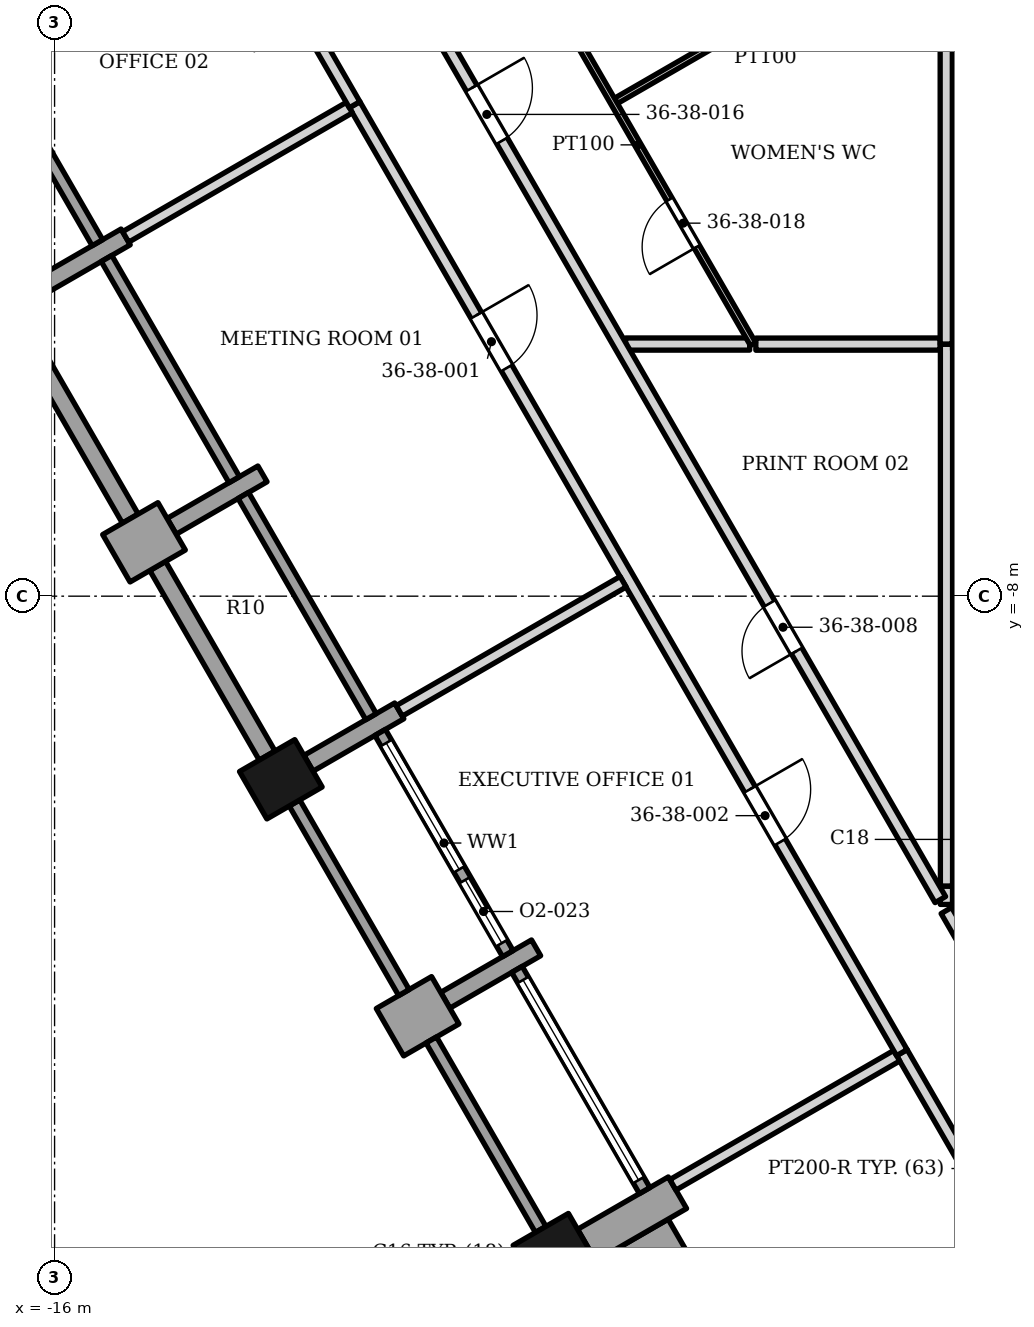
"""IFC4 building model, lengths in metres.
Left out: names, types, materials, properties, quantities, classifications, styles, units other than length and angle.
Written with IfcOpenShell. Run it as: python <this file> out.ifc"""

import sys

from ifc_helpers import new_model, si_unit, direction, frame, frame_2d, origin, origin_2d, place, context, subcontext, project, spatial, polyline, rectangle, outline, extrude, element, fill, save


model = new_model("IFC4")
c1 = context("Model", 3, precision=1e-05, world=origin(), true_north=direction((0.0, 1.0)))
c2 = subcontext(c1, "Body", "Model", "MODEL_VIEW")
j1 = project(units=[si_unit("LENGTHUNIT", "METRE"), si_unit("PLANEANGLEUNIT", "RADIAN")], contexts=[c1])
p1 = place(None, origin())
s1 = spatial("IfcSite", under=j1, at=p1, CompositionType="ELEMENT")
p2 = place(p1, origin())
s2 = spatial("IfcBuilding", under=s1, at=p2, CompositionType="ELEMENT")
p3 = place(p2, frame((0.0, 0.0, 156.3)))
s3 = spatial("IfcBuildingStorey", under=s2, at=p3, CompositionType="ELEMENT", Elevation=156.3)
for number, where, z_axis, x_axis in (
    (1, (-12.279, -11.011, 0.0), (0.0, 0.0, 1.0), (0.5, -0.866, 0.0)),
    (2, (-7.779, -18.803, 0.0), (0.0, 0.0, 1.0), (0.5, -0.866, 0.0)),
):
    element("IfcColumn", number, at=place(p3, frame(where, z_axis=z_axis, x_axis=x_axis)), inside=s3, PredefinedType="COLUMN", context=c2, shape_type="SweptSolid", body=[
        extrude(rectangle(XDim=0.9, YDim=1.05, at=origin_2d()), origin(), (0.0, 0.0, 1.0), 3.9),
    ])
p4 = place(p3, frame((-16.324, -2.954, 0.0), z_axis=(0.0, 0.0, 1.0), x_axis=(0.86597814115, 0.500081852351, 0.0)))
e3 = element("IfcWall", 3, at=p4, inside=s3, PredefinedType="SOLIDWALL", context=c2, shape_type="SweptSolid", body=[
    extrude(rectangle(XDim=1.725, YDim=0.3, at=frame_2d((0.862, 0.0))), origin(), (0.0, 0.0, 1.0), 3.0),
])
p5 = place(p3, frame((-14.984, -7.376, 0.0), z_axis=(0.0, 0.0, 1.0), x_axis=(0.866030680601, 0.499990860175, 0.0)))
e4 = element("IfcWall", 4, at=p5, inside=s3, PredefinedType="SOLIDWALL", context=c2, shape_type="SweptSolid", body=[
    extrude(rectangle(XDim=1.05, YDim=0.9, at=frame_2d((0.525, 0.0))), origin(), (0.0, 0.0, 1.0), 3.0),
])
p6 = place(p3, frame((-14.075, -6.852, 0.0), z_axis=(0.0, 0.0, 1.0), x_axis=(0.866013532718, 0.500020560727, 0.0)))
e5 = element("IfcWall", 5, at=p6, inside=s3, PredefinedType="SOLIDWALL", context=c2, shape_type="SweptSolid", body=[
    extrude(rectangle(XDim=1.725, YDim=0.3, at=frame_2d((0.863, 0.0))), origin(), (0.0, 0.0, 1.0), 2.973),
])
p7 = place(p3, frame((-10.331, -9.886, 0.0), z_axis=(0.0, 0.0, 1.0), x_axis=(-0.86597814115, -0.500081852351, 0.0)))
e6 = element("IfcWall", 6, at=p7, inside=s3, PredefinedType="SOLIDWALL", context=c2, shape_type="SweptSolid", body=[
    extrude(rectangle(XDim=1.725, YDim=0.3, at=frame_2d((0.862, 0.0))), origin(), (0.0, 0.0, 1.0), 3.0),
])
p8 = place(p3, frame((-10.484, -15.171, 0.0), z_axis=(0.0, 0.0, 1.0), x_axis=(0.866030680601, 0.499990860175, 0.0)))
e7 = element("IfcWall", 7, at=p8, inside=s3, PredefinedType="SOLIDWALL", context=c2, shape_type="SweptSolid", body=[
    extrude(rectangle(XDim=1.05, YDim=0.9, at=frame_2d((0.525, 0.0))), origin(), (0.0, 0.0, 1.0), 3.0),
])
p9 = place(p3, frame((-9.575, -14.646, 0.0), z_axis=(0.0, 0.0, 1.0), x_axis=(0.866013532718, 0.500020560727, 0.0)))
e8 = element("IfcWall", 8, at=p9, inside=s3, PredefinedType="SOLIDWALL", context=c2, shape_type="SweptSolid", body=[
    extrude(rectangle(XDim=1.725, YDim=0.3, at=frame_2d((0.863, 0.0))), origin(), (0.0, 0.0, 1.0), 3.0),
])
p10 = place(p3, frame((-5.756, -17.81, 0.0), z_axis=(0.0, 0.0, 1.0), x_axis=(-0.866074815912, -0.499914405916, 0.0)))
e9 = element("IfcWall", 9, at=p10, inside=s3, PredefinedType="SOLIDWALL", context=c2, shape_type="SweptSolid", body=[
    extrude(rectangle(XDim=1.725, YDim=0.6, at=frame_2d((0.862, 0.0))), origin(), (0.0, 0.0, 1.0), 3.0),
])
p11 = place(p3, frame((-17.396, 1.45, 0.0), z_axis=(0.0, 0.0, 1.0), x_axis=(0.500002543286, -0.866023935413, 0.0)))
e10 = element("IfcWall", 10, at=p11, inside=s3, PredefinedType="ELEMENTEDWALL", context=c2, shape_type="SweptSolid", body=[
    extrude(rectangle(XDim=4.2, YDim=0.2, at=frame_2d((2.1, 0.0))), origin(), (0.0, 0.0, 1.0), 3.0),
])
p12 = place(p3, frame((-16.554, -3.606, 0.0), z_axis=(0.0, 0.0, 1.0), x_axis=(0.499931829785, -0.866064758299, 0.0)))
e11 = element("IfcWall", 11, at=p12, inside=s3, PredefinedType="SOLIDWALL", context=c2, shape_type="SweptSolid", body=[
    extrude(rectangle(XDim=3.6, YDim=0.3, at=frame_2d((1.8, 0.0))), origin(), (0.0, 0.0, 1.0), 3.0),
])
p13 = place(p3, frame((-15.146, -2.447, 0.0), z_axis=(0.0, 0.0, 1.0), x_axis=(0.500027713859, -0.866009402589, 0.0)))
e12 = element("IfcWall", 12, at=p13, inside=s3, PredefinedType="ELEMENTEDWALL", context=c2, shape_type="SweptSolid", body=[
    extrude(rectangle(XDim=4.2, YDim=0.2, at=frame_2d((2.1, 0.0))), origin(), (0.0, 0.0, 1.0), 2.973),
])
p14 = place(p3, frame((-14.304, -7.504, 0.0), z_axis=(0.0, 0.0, 1.0), x_axis=(0.499961193289, -0.866047807691, 0.0)))
e13 = element("IfcWall", 13, at=p14, inside=s3, PredefinedType="SOLIDWALL", context=c2, shape_type="SweptSolid", body=[
    extrude(rectangle(XDim=3.6, YDim=0.3, at=frame_2d((1.8, 0.0))), origin(), (0.0, 0.0, 1.0), 2.973),
])
p15 = place(p3, frame((-12.896, -6.344, 0.0), z_axis=(0.0, 0.0, 1.0), x_axis=(0.500002543286, -0.866023935413, 0.0)))
e14 = element("IfcWall", 14, at=p15, inside=s3, PredefinedType="ELEMENTEDWALL", context=c2, shape_type="SweptSolid", body=[
    extrude(rectangle(XDim=4.2, YDim=0.2, at=frame_2d((2.1, 0.0))), origin(), (0.0, 0.0, 1.0), 3.0),
])
p16 = place(p3, frame((-12.054, -11.401, 0.0), z_axis=(0.0, 0.0, 1.0), x_axis=(0.499961193289, -0.866047807691, 0.0)))
e15 = element("IfcWall", 15, at=p16, inside=s3, PredefinedType="SOLIDWALL", context=c2, shape_type="SweptSolid", body=[
    extrude(rectangle(XDim=3.6, YDim=0.2, at=frame_2d((1.8, 0.0))), origin(), (0.0, 0.0, 1.0), 2.95),
])
p17 = place(p3, frame((-10.646, -10.241, 0.0), z_axis=(0.0, 0.0, 1.0), x_axis=(0.500027713859, -0.866009402589, 0.0)))
e16 = element("IfcWall", 16, at=p17, inside=s3, PredefinedType="ELEMENTEDWALL", context=c2, shape_type="SweptSolid", body=[
    extrude(rectangle(XDim=4.2, YDim=0.2, at=frame_2d((2.1, 0.0))), origin(), (0.0, 0.0, 1.0), 2.95),
])
p18 = place(p17, frame((0.2, 0.0, 0.45)))
e17 = element("IfcOpeningElement", 17, at=p18, cuts=e16, PredefinedType="OPENING", context=c2, shape_type="SweptSolid", body=[
    extrude(rectangle(XDim=2.4, YDim=2.25, at=frame_2d((1.2, 1.125))), frame((0.0, 0.11, 0.0), z_axis=(0.0, -1.0, 0.0), x_axis=(1.0, 0.0, 0.0)), (0.0, 0.0, 1.0), 0.22),
])
p19 = place(p17, frame((2.8, 0.0, 0.0)))
e18 = element("IfcOpeningElement", 18, at=p19, cuts=e16, PredefinedType="OPENING", context=c2, shape_type="SweptSolid", body=[
    extrude(rectangle(XDim=1.2, YDim=2.7, at=frame_2d((0.6, 1.35))), frame((0.0, 0.11, 0.0), z_axis=(0.0, -1.0, 0.0), x_axis=(1.0, 0.0, 0.0)), (0.0, 0.0, 1.0), 0.22),
])
p20 = place(p3, origin())
e19 = element("IfcWall", 19, at=p20, inside=s3, PredefinedType="SOLIDWALL", context=c2, shape_type="SweptSolid", body=[
    extrude(outline(polyline([(-9.891, -15.348), (-8.092, -18.464), (-7.919, -18.364), (-9.718, -15.248), (-9.891, -15.348)])), origin(), (0.0, 0.0, 1.0), 3.0),
])
p21 = place(p3, frame((-8.396, -14.138, 0.0), z_axis=(0.0, 0.0, 1.0), x_axis=(0.500027713859, -0.866009402589, 0.0)))
e20 = element("IfcWall", 20, at=p21, inside=s3, PredefinedType="ELEMENTEDWALL", context=c2, shape_type="SweptSolid", body=[
    extrude(rectangle(XDim=4.2, YDim=0.2, at=frame_2d((2.1, 0.0))), origin(), (0.0, 0.0, 1.0), 3.0),
])
p22 = place(p21, frame((0.2, 0.0, 0.45)))
e21 = element("IfcOpeningElement", 21, at=p22, cuts=e20, PredefinedType="OPENING", context=c2, shape_type="SweptSolid", body=[
    extrude(rectangle(XDim=3.8, YDim=2.25, at=frame_2d((1.9, 1.125))), frame((0.0, 0.11, 0.0), z_axis=(0.0, -1.0, 0.0), x_axis=(1.0, 0.0, 0.0)), (0.0, 0.0, 1.0), 0.22),
])
p23 = place(p3, frame((-5.563, -18.844, 0.0), z_axis=(0.0, 0.0, 1.0), x_axis=(-0.865997808697, -0.500047793048, 0.0)))
e22 = element("IfcWall", 22, at=p23, inside=s3, PredefinedType="SOLIDWALL", context=c2, shape_type="SweptSolid", body=[
    extrude(rectangle(XDim=2.425, YDim=1.384, at=frame_2d((1.212, 0.0))), origin(), (0.0, 0.0, 1.0), 3.0),
])
p24 = place(p3, frame((-2.065, -15.507, 0.0), z_axis=(0.0, 0.0, 1.0), x_axis=(0.500349665943, -0.865823429916, 0.0)))
e23 = element("IfcWall", 23, at=p24, inside=s3, PredefinedType="PARTITIONING", context=c2, shape_type="SweptSolid", body=[
    extrude(rectangle(XDim=4.402, YDim=0.2, at=frame_2d((2.201, 0.0))), origin(), (0.0, 0.0, 1.0), 3.128),
])
p25 = place(p3, frame((-5.831, -17.681, 0.0), z_axis=(0.0, 0.0, 1.0), x_axis=(0.866217148336, 0.499667741532, 0.0)))
e24 = element("IfcWall", 24, at=p25, inside=s3, PredefinedType="PARTITIONING", context=c2, shape_type="SweptSolid", body=[
    extrude(rectangle(XDim=4.25, YDim=0.2, at=frame_2d((2.125, 0.0))), origin(), (0.0, 0.0, 1.0), 3.052),
])
p26 = place(p3, frame((-11.065, 0.082, 0.0), z_axis=(0.0, 0.0, 1.0), x_axis=(0.499996012009, -0.86602770624, 0.0)))
e25 = element("IfcWall", 25, at=p26, inside=s3, PredefinedType="PARTITIONING", context=c2, shape_type="SweptSolid", body=[
    extrude(rectangle(XDim=18.0, YDim=0.2, at=frame_2d((9.0, 0.0))), origin(), (0.0, 0.0, 1.0), 2.884),
])
p27 = place(p26, frame((4.0, 0.0, 0.0)))
e26 = element("IfcOpeningElement", 26, at=p27, cuts=e25, PredefinedType="OPENING", context=c2, shape_type="SweptSolid", body=[
    extrude(rectangle(XDim=1.0, YDim=2.1, at=frame_2d((0.5, 1.05))), frame((0.0, 0.11, 0.0), z_axis=(0.0, -1.0, 0.0), x_axis=(1.0, 0.0, 0.0)), (0.0, 0.0, 1.0), 0.22),
])
p28 = place(p26, frame((13.0, 0.0, 0.0)))
e27 = element("IfcOpeningElement", 27, at=p28, cuts=e25, PredefinedType="OPENING", context=c2, shape_type="SweptSolid", body=[
    extrude(rectangle(XDim=1.0, YDim=2.4, at=frame_2d((0.5, 1.2))), frame((0.0, 0.11, 0.0), z_axis=(0.0, -1.0, 0.0), x_axis=(1.0, 0.0, 0.0)), (0.0, 0.0, 1.0), 0.22),
])
p29 = place(p3, frame((-1.333, -13.169, 0.0), z_axis=(0.0, 0.0, 1.0), x_axis=(0.499982728352, -0.866035375346, 0.0)))
e28 = element("IfcWall", 28, at=p29, inside=s3, PredefinedType="PARTITIONING", context=c2, shape_type="SweptSolid", body=[
    extrude(rectangle(XDim=2.842, YDim=0.2, at=frame_2d((1.421, 0.0))), origin(), (0.0, 0.0, 1.0), 3.128),
])
p30 = place(p3, frame((-1.333, -13.07, 0.0), z_axis=(0.0, 0.0, 1.0), x_axis=(0.004870072116, 0.999988141128, 0.0)))
e29 = element("IfcWall", 29, at=p30, inside=s3, PredefinedType="PARTITIONING", context=c2, shape_type="SweptSolid", body=[
    extrude(rectangle(XDim=0.301, YDim=0.2, at=frame_2d((0.15, 0.0))), origin(), (0.0, 0.0, 1.0), 3.73),
])
p31 = place(p3, frame((-1.245, -12.717, 0.0), z_axis=(0.0, 0.0, 1.0), x_axis=(0.867141243483, 0.498062309205, 0.0)))
e30 = element("IfcWall", 30, at=p31, inside=s3, PredefinedType="PARTITIONING", context=c2, shape_type="SweptSolid", body=[
    extrude(rectangle(XDim=0.628, YDim=0.2, at=frame_2d((0.314, 0.0))), origin(), (0.0, 0.0, 1.0), 3.73),
])
p32 = place(p3, frame((-10.331, -9.886, 0.0), z_axis=(0.0, 0.0, 1.0), x_axis=(0.866245832331, 0.499618012055, 0.0)))
e31 = element("IfcWall", 31, at=p32, inside=s3, PredefinedType="PARTITIONING", context=c2, shape_type="SweptSolid", body=[
    extrude(rectangle(XDim=4.25, YDim=0.2, at=frame_2d((2.125, 0.0))), origin(), (0.0, 0.0, 1.0), 3.052),
])
p33 = place(p3, frame((-4.467, -3.855, 0.0), z_axis=(0.0, 0.0, 1.0), x_axis=(0.999999841097, 0.000563743166, 0.0)))
e32 = element("IfcWall", 32, at=p33, inside=s3, PredefinedType="PARTITIONING", context=c2, shape_type="SweptSolid", body=[
    extrude(rectangle(XDim=3.031, YDim=0.2, at=frame_2d((1.516, 0.0))), origin(), (0.0, 0.0, 1.0), 3.73),
])
p34 = place(p3, frame((-1.332, -12.767, 0.0), z_axis=(0.0, 0.0, 1.0), x_axis=(0.0, 1.0, 0.0)))
e33 = element("IfcWall", 33, at=p34, inside=s3, PredefinedType="PARTITIONING", context=c2, shape_type="SweptSolid", body=[
    extrude(rectangle(XDim=8.909, YDim=0.2, at=frame_2d((4.455, 0.0))), origin(), (0.0, 0.0, 1.0), 2.95),
])
p35 = place(p3, frame((-1.232, -3.857, 0.0), z_axis=(0.0, 0.0, 1.0), x_axis=(0.999999961423, 0.000277766745, 0.0)))
e34 = element("IfcWall", 34, at=p35, inside=s3, PredefinedType="PARTITIONING", context=c2, shape_type="SweptSolid", body=[
    extrude(rectangle(XDim=6.153, YDim=0.2, at=frame_2d((3.076, 0.0))), origin(), (0.0, 0.0, 1.0), 3.73),
])
p36 = place(p3, frame((-6.61, -3.854, 0.0), z_axis=(0.0, 0.0, 1.0), x_axis=(0.999999992849, 0.000119588614, 0.0)))
e35 = element("IfcWall", 35, at=p36, inside=s3, PredefinedType="PARTITIONING", context=c2, shape_type="SweptSolid", body=[
    extrude(rectangle(XDim=2.042, YDim=0.2, at=frame_2d((1.021, 0.0))), origin(), (0.0, 0.0, 1.0), 3.73),
])
p37 = place(p3, frame((-1.335, -3.854, 0.0), z_axis=(0.0, 0.0, 1.0), x_axis=(0.0, 1.0, 0.0)))
e36 = element("IfcWall", 36, at=p37, inside=s3, PredefinedType="PARTITIONING", context=c2, shape_type="SweptSolid", body=[
    extrude(rectangle(XDim=6.104, YDim=0.2, at=frame_2d((3.052, 0.0))), origin(), (0.0, 0.0, 1.0), 3.73),
])
p38 = place(p3, frame((-14.831, -2.091, 0.0), z_axis=(0.0, 0.0, 1.0), x_axis=(0.865857330643, 0.500290998291, 0.0)))
e37 = element("IfcWall", 37, at=p38, inside=s3, PredefinedType="PARTITIONING", context=c2, shape_type="SweptSolid", body=[
    extrude(rectangle(XDim=4.25, YDim=0.2, at=frame_2d((2.125, 0.0))), origin(), (0.0, 0.0, 1.0), 2.973),
])
p39 = place(p3, frame((-13.152, 3.699, 0.0), z_axis=(0.0, 0.0, 1.0), x_axis=(0.499717391966, -0.866188506139, 0.0)))
e38 = element("IfcWall", 38, at=p39, inside=s3, PredefinedType="PARTITIONING", context=c2, shape_type="SweptSolid", body=[
    extrude(rectangle(XDim=4.176, YDim=0.2, at=frame_2d((2.088, 0.0))), origin(), (0.0, 0.0, 1.0), 3.73),
])
p40 = place(p39, frame((1.588, 0.0, 0.0)))
e39 = element("IfcOpeningElement", 39, at=p40, cuts=e38, PredefinedType="OPENING", context=c2, shape_type="SweptSolid", body=[
    extrude(rectangle(XDim=1.0, YDim=2.4, at=frame_2d((0.5, 1.2))), frame((0.0, 0.11, 0.0), z_axis=(0.0, -1.0, 0.0), x_axis=(1.0, 0.0, 0.0)), (0.0, 0.0, 1.0), 0.22),
])
p41 = place(p3, frame((-6.767, 0.145, 0.0), z_axis=(0.0, 0.0, 1.0), x_axis=(0.865929781716, 0.500165585718, 0.0)))
e40 = element("IfcWall", 40, at=p41, inside=s3, PredefinedType="PARTITIONING", context=c2, shape_type="SweptSolid", body=[
    extrude(rectangle(XDim=4.212, YDim=0.1, at=frame_2d((2.106, 0.0))), origin(), (0.0, 0.0, 1.0), 2.884),
])
p42 = place(p3, frame((-8.3, 2.697, 0.0), z_axis=(0.0, 0.0, 1.0), x_axis=(0.500524865803, -0.86572216023, 0.0)))
e41 = element("IfcWall", 41, at=p42, inside=s3, PredefinedType="PARTITIONING", context=c2, shape_type="SweptSolid", body=[
    extrude(rectangle(XDim=7.566, YDim=0.1, at=frame_2d((3.783, 0.0))), origin(), (0.0, 0.0, 1.0), 2.884),
])
p43 = place(p42, frame((0.858, 0.0, 0.0)))
e42 = element("IfcOpeningElement", 42, at=p43, cuts=e41, PredefinedType="OPENING", context=c2, shape_type="SweptSolid", body=[
    extrude(rectangle(XDim=0.9, YDim=2.1, at=frame_2d((0.45, 1.05))), frame((0.0, 0.06, 0.0), z_axis=(0.0, -1.0, 0.0), x_axis=(1.0, 0.0, 0.0)), (0.0, 0.0, 1.0), 0.12),
])
p44 = place(p42, frame((4.82, 0.0, 0.0)))
e43 = element("IfcOpeningElement", 43, at=p44, cuts=e41, PredefinedType="OPENING", context=c2, shape_type="SweptSolid", body=[
    extrude(rectangle(XDim=0.9, YDim=2.1, at=frame_2d((0.45, 1.05))), frame((0.0, 0.06, 0.0), z_axis=(0.0, -1.0, 0.0), x_axis=(1.0, 0.0, 0.0)), (0.0, 0.0, 1.0), 0.12),
])
p45 = place(p3, frame((-11.073, 3.7, 0.0), z_axis=(0.0, 0.0, 1.0), x_axis=(0.50018368245, -0.865919328697, 0.0)))
e44 = element("IfcWall", 44, at=p45, inside=s3, PredefinedType="PARTITIONING", context=c2, shape_type="SweptSolid", body=[
    extrude(rectangle(XDim=19.274, YDim=0.2, at=frame_2d((9.637, 0.0))), origin(), (0.0, 0.0, 1.0), 2.884),
])
p46 = place(p45, frame((13.651, 0.0, 0.0)))
e45 = element("IfcOpeningElement", 45, at=p46, cuts=e44, PredefinedType="OPENING", context=c2, shape_type="SweptSolid", body=[
    extrude(rectangle(XDim=0.9, YDim=2.1, at=frame_2d((0.45, 1.05))), frame((0.0, 0.11, 0.0), z_axis=(0.0, -1.0, 0.0), x_axis=(1.0, 0.0, 0.0)), (0.0, 0.0, 1.0), 0.22),
])
p47 = place(p45, frame((3.862, 0.0, 0.0)))
e46 = element("IfcOpeningElement", 46, at=p47, cuts=e44, PredefinedType="OPENING", context=c2, shape_type="SweptSolid", body=[
    extrude(rectangle(XDim=1.0, YDim=2.1, at=frame_2d((0.5, 1.05))), frame((0.0, 0.11, 0.0), z_axis=(0.0, -1.0, 0.0), x_axis=(1.0, 0.0, 0.0)), (0.0, 0.0, 1.0), 0.22),
])
p48 = place(p18, origin())
e47 = element("IfcWindow", 47, at=p48, inside=s3, PartitioningType="SINGLE_PANEL", PredefinedType="WINDOW", context=c2, shape_type="SweptSolid", body=[
    extrude(rectangle(XDim=2.4, YDim=2.25, at=frame_2d((1.2, 1.125))), frame((0.0, 0.03, 0.0), z_axis=(0.0, -1.0, 0.0), x_axis=(1.0, 0.0, 0.0)), (0.0, 0.0, 1.0), 0.06),
])
fill(e17, e47)
p49 = place(p19, origin())
e48 = element("IfcDoor", 48, at=p49, inside=s3, OperationType="SINGLE_SWING_LEFT", PredefinedType="DOOR", context=c2, shape_type="SweptSolid", body=[
    extrude(rectangle(XDim=1.2, YDim=2.7, at=frame_2d((0.6, 1.35))), frame((0.0, 0.025, 0.0), z_axis=(0.0, -1.0, 0.0), x_axis=(1.0, 0.0, 0.0)), (0.0, 0.0, 1.0), 0.05),
])
fill(e18, e48)
p50 = place(p22, origin())
e49 = element("IfcWindow", 49, at=p50, inside=s3, PartitioningType="SINGLE_PANEL", PredefinedType="WINDOW", context=c2, shape_type="SweptSolid", body=[
    extrude(rectangle(XDim=3.8, YDim=2.25, at=frame_2d((1.9, 1.125))), frame((0.0, 0.03, 0.0), z_axis=(0.0, -1.0, 0.0), x_axis=(1.0, 0.0, 0.0)), (0.0, 0.0, 1.0), 0.06),
])
fill(e21, e49)
p51 = place(p27, origin())
e50 = element("IfcDoor", 50, at=p51, inside=s3, OperationType="SINGLE_SWING_LEFT", PredefinedType="DOOR", context=c2, shape_type="SweptSolid", body=[
    extrude(rectangle(XDim=1.0, YDim=2.1, at=frame_2d((0.5, 1.05))), frame((0.0, 0.025, 0.0), z_axis=(0.0, -1.0, 0.0), x_axis=(1.0, 0.0, 0.0)), (0.0, 0.0, 1.0), 0.05),
])
fill(e26, e50)
p52 = place(p28, origin())
e51 = element("IfcDoor", 51, at=p52, inside=s3, OperationType="SINGLE_SWING_LEFT", PredefinedType="DOOR", context=c2, shape_type="SweptSolid", body=[
    extrude(rectangle(XDim=1.0, YDim=2.4, at=frame_2d((0.5, 1.2))), frame((0.0, 0.025, 0.0), z_axis=(0.0, -1.0, 0.0), x_axis=(1.0, 0.0, 0.0)), (0.0, 0.0, 1.0), 0.05),
])
fill(e27, e51)
p53 = place(p46, origin())
e52 = element("IfcDoor", 52, at=p53, inside=s3, OperationType="SINGLE_SWING_RIGHT", PredefinedType="DOOR", context=c2, shape_type="SweptSolid", body=[
    extrude(rectangle(XDim=0.9, YDim=2.1, at=frame_2d((0.45, 1.05))), frame((0.0, 0.025, 0.0), z_axis=(0.0, -1.0, 0.0), x_axis=(1.0, 0.0, 0.0)), (0.0, 0.0, 1.0), 0.05),
])
fill(e45, e52)
p54 = place(p47, origin())
e53 = element("IfcDoor", 53, at=p54, inside=s3, OperationType="SINGLE_SWING_LEFT", PredefinedType="DOOR", context=c2, shape_type="SweptSolid", body=[
    extrude(rectangle(XDim=1.0, YDim=2.1, at=frame_2d((0.5, 1.05))), frame((0.0, 0.025, 0.0), z_axis=(0.0, -1.0, 0.0), x_axis=(1.0, 0.0, 0.0)), (0.0, 0.0, 1.0), 0.05),
])
fill(e46, e53)
p55 = place(p44, origin())
e54 = element("IfcDoor", 54, at=p55, inside=s3, OperationType="SINGLE_SWING_RIGHT", PredefinedType="DOOR", context=c2, shape_type="SweptSolid", body=[
    extrude(rectangle(XDim=0.9, YDim=2.1, at=frame_2d((0.45, 1.05))), frame((0.0, 0.025, 0.0), z_axis=(0.0, -1.0, 0.0), x_axis=(1.0, 0.0, 0.0)), (0.0, 0.0, 1.0), 0.05),
])
fill(e43, e54)
save(model, sys.argv[1])
